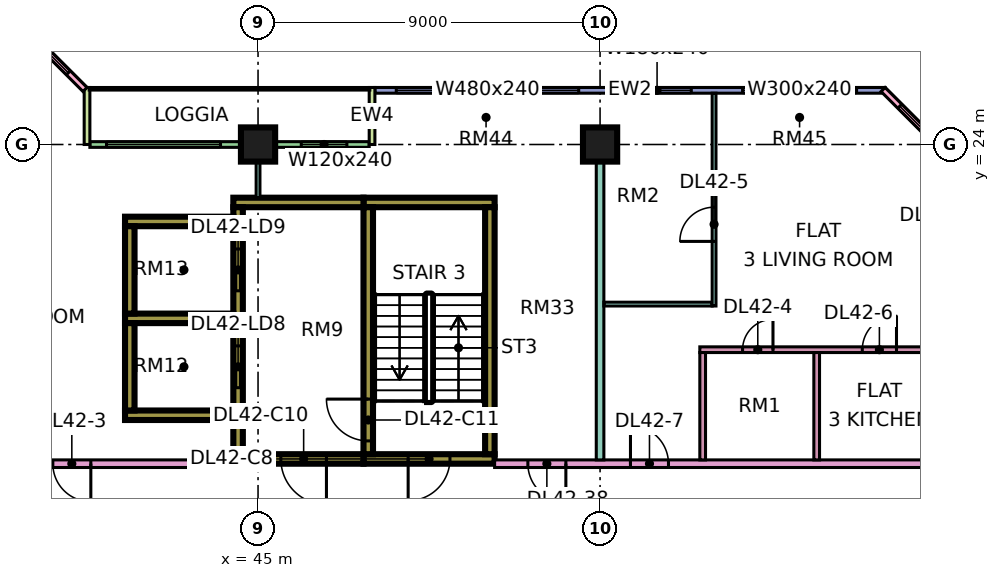
"""IFC4 building model, lengths in metres.
Left out: names, types, materials, properties, quantities, classifications, styles, units other than length and angle.
Written with IfcOpenShell. Run it as: python <this file> out.ifc"""

import sys

from ifc_helpers import new_model, si_unit, direction, frame, frame_2d, origin, origin_2d, place, context, subcontext, project, spatial, rectangle, extrude, element, fill, save


model = new_model("IFC4")
c1 = context("Model", 3, precision=1e-05, world=origin(), true_north=direction((0.0, 1.0)))
c2 = subcontext(c1, "Body", "Model", "MODEL_VIEW")
j1 = project(units=[si_unit("LENGTHUNIT", "METRE"), si_unit("PLANEANGLEUNIT", "RADIAN")], contexts=[c1])
p1 = place(None, origin())
s1 = spatial("IfcSite", under=j1, at=p1, CompositionType="ELEMENT")
p2 = place(p1, origin())
s2 = spatial("IfcBuilding", under=s1, at=p2, CompositionType="ELEMENT")
p3 = place(p2, frame((0.0, 0.0, 183.65)))
s3 = spatial("IfcBuildingStorey", under=s2, at=p3, CompositionType="ELEMENT", Elevation=183.65)
for number, where, z_axis, x_axis in (
    (1, (45.0, 24.0, 0.0), (0.0, 0.0, 1.0), (1.0, 0.0, 0.0)),
    (2, (54.0, 24.0, 0.0), (0.0, 0.0, 1.0), (1.0, 0.0, 0.0)),
):
    element("IfcColumn", number, at=place(p3, frame(where, z_axis=z_axis, x_axis=x_axis)), inside=s3, PredefinedType="COLUMN", context=c2, shape_type="SweptSolid", body=[
        extrude(rectangle(XDim=0.9, YDim=0.9, at=origin_2d()), origin(), (0.0, 0.0, 1.0), 3.75),
    ])
p4 = place(p3, frame((47.775, 15.725, 0.0), z_axis=(0.0, 0.0, 1.0), x_axis=(1.0, 0.0, 0.0)))
e3 = element("IfcWall", 3, at=p4, inside=s3, PredefinedType="SHEAR", context=c2, shape_type="SweptSolid", body=[
    extrude(rectangle(XDim=3.45, YDim=0.25, at=frame_2d((1.725, 0.0))), origin(), (0.0, 0.0, 1.0), 3.75),
])
p5 = place(p4, frame((1.175, 0.0, 0.0)))
e4 = element("IfcOpeningElement", 4, at=p5, cuts=e3, PredefinedType="OPENING", context=c2, shape_type="SweptSolid", body=[
    extrude(rectangle(XDim=1.1, YDim=2.2, at=frame_2d((0.55, 1.1))), frame((0.0, 0.135, 0.0), z_axis=(0.0, -1.0, 0.0), x_axis=(1.0, 0.0, 0.0)), (0.0, 0.0, 1.0), 0.27),
])
p6 = place(p3, frame((47.775, 22.475, 0.0), z_axis=(0.0, 0.0, 1.0), x_axis=(1.0, 0.0, 0.0)))
e5 = element("IfcWall", 5, at=p6, inside=s3, PredefinedType="SHEAR", context=c2, shape_type="SweptSolid", body=[
    extrude(rectangle(XDim=3.45, YDim=0.25, at=frame_2d((1.725, 0.0))), origin(), (0.0, 0.0, 1.0), 3.75),
])
p7 = place(p3, frame((47.9, 15.85, 0.0), z_axis=(0.0, 0.0, 1.0), x_axis=(0.0, 1.0, 0.0)))
e6 = element("IfcWall", 6, at=p7, inside=s3, PredefinedType="SHEAR", context=c2, shape_type="SweptSolid", body=[
    extrude(rectangle(XDim=6.5, YDim=0.25, at=frame_2d((3.25, 0.0))), origin(), (0.0, 0.0, 1.0), 3.75),
])
p8 = place(p7, frame((0.35, 0.0, 0.0)))
e7 = element("IfcOpeningElement", 7, at=p8, cuts=e6, PredefinedType="OPENING", context=c2, shape_type="SweptSolid", body=[
    extrude(rectangle(XDim=1.1, YDim=2.2, at=frame_2d((0.55, 1.1))), frame((0.0, 0.135, 0.0), z_axis=(0.0, -1.0, 0.0), x_axis=(1.0, 0.0, 0.0)), (0.0, 0.0, 1.0), 0.27),
])
p9 = place(p3, frame((51.1, 15.85, 0.0), z_axis=(0.0, 0.0, 1.0), x_axis=(0.0, 1.0, 0.0)))
e8 = element("IfcWall", 8, at=p9, inside=s3, PredefinedType="SHEAR", context=c2, shape_type="SweptSolid", body=[
    extrude(rectangle(XDim=6.5, YDim=0.25, at=frame_2d((3.25, 0.0))), origin(), (0.0, 0.0, 1.0), 3.75),
])
p10 = place(p3, frame((44.35, 15.725, 0.0), z_axis=(0.0, 0.0, 1.0), x_axis=(1.0, 0.0, 0.0)))
e9 = element("IfcWall", 9, at=p10, inside=s3, PredefinedType="SHEAR", context=c2, shape_type="SweptSolid", body=[
    extrude(rectangle(XDim=3.425, YDim=0.25, at=frame_2d((1.712, 0.0))), origin(), (0.0, 0.0, 1.0), 3.75),
])
p11 = place(p10, frame((1.25, 0.0, 0.0)))
e10 = element("IfcOpeningElement", 10, at=p11, cuts=e9, PredefinedType="OPENING", context=c2, shape_type="SweptSolid", body=[
    extrude(rectangle(XDim=1.2, YDim=2.2, at=frame_2d((0.6, 1.1))), frame((0.0, 0.135, 0.0), z_axis=(0.0, -1.0, 0.0), x_axis=(1.0, 0.0, 0.0)), (0.0, 0.0, 1.0), 0.27),
])
p12 = place(p3, frame((44.35, 22.475, 0.0), z_axis=(0.0, 0.0, 1.0), x_axis=(1.0, 0.0, 0.0)))
e11 = element("IfcWall", 11, at=p12, inside=s3, PredefinedType="SHEAR", context=c2, shape_type="SweptSolid", body=[
    extrude(rectangle(XDim=3.425, YDim=0.25, at=frame_2d((1.712, 0.0))), origin(), (0.0, 0.0, 1.0), 3.75),
])
p13 = place(p3, frame((44.475, 15.85, 0.0), z_axis=(0.0, 0.0, 1.0), x_axis=(0.0, 1.0, 0.0)))
e12 = element("IfcWall", 12, at=p13, inside=s3, PredefinedType="SHEAR", context=c2, shape_type="SweptSolid", body=[
    extrude(rectangle(XDim=6.5, YDim=0.25, at=frame_2d((3.25, 0.0))), origin(), (0.0, 0.0, 1.0), 3.75),
])
p14 = place(p13, frame((1.75, 0.0, 0.0)))
e13 = element("IfcOpeningElement", 13, at=p14, cuts=e12, PredefinedType="OPENING", context=c2, shape_type="SweptSolid", body=[
    extrude(rectangle(XDim=1.1, YDim=2.2, at=frame_2d((0.55, 1.1))), frame((0.0, 0.135, 0.0), z_axis=(0.0, -1.0, 0.0), x_axis=(1.0, 0.0, 0.0)), (0.0, 0.0, 1.0), 0.27),
])
p15 = place(p13, frame((4.3, 0.0, 0.0)))
e14 = element("IfcOpeningElement", 14, at=p15, cuts=e12, PredefinedType="OPENING", context=c2, shape_type="SweptSolid", body=[
    extrude(rectangle(XDim=1.1, YDim=2.2, at=frame_2d((0.55, 1.1))), frame((0.0, 0.135, 0.0), z_axis=(0.0, -1.0, 0.0), x_axis=(1.0, 0.0, 0.0)), (0.0, 0.0, 1.0), 0.27),
])
for number, where, z_axis, x_axis in (
    (15, (41.5, 16.875, 0.0), (0.0, 0.0, 1.0), (1.0, 0.0, 0.0)),
    (16, (41.5, 19.425, 0.0), (0.0, 0.0, 1.0), (1.0, 0.0, 0.0)),
    (17, (41.5, 21.975, 0.0), (0.0, 0.0, 1.0), (1.0, 0.0, 0.0)),
):
    element("IfcWall", number, at=place(p3, frame(where, z_axis=z_axis, x_axis=x_axis)), inside=s3, PredefinedType="SHEAR", context=c2, shape_type="SweptSolid", body=[
        extrude(rectangle(XDim=2.85, YDim=0.25, at=frame_2d((1.425, 0.0))), origin(), (0.0, 0.0, 1.0), 3.75),
    ])
for number, where, z_axis, x_axis in (
    (18, (41.625, 17.0, 0.0), (0.0, 0.0, 1.0), (0.0, 1.0, 0.0)),
    (19, (41.625, 19.55, 0.0), (0.0, 0.0, 1.0), (0.0, 1.0, 0.0)),
):
    element("IfcWall", number, at=place(p3, frame(where, z_axis=z_axis, x_axis=x_axis)), inside=s3, PredefinedType="SHEAR", context=c2, shape_type="SweptSolid", body=[
        extrude(rectangle(XDim=2.3, YDim=0.25, at=frame_2d((1.15, 0.0))), origin(), (0.0, 0.0, 1.0), 3.75),
    ])
p16 = place(p3, frame((61.5, 25.425, 0.0), z_axis=(0.0, 0.0, 1.0), x_axis=(-1.0, 0.0, 0.0)))
e20 = element("IfcWall", 20, at=p16, inside=s3, PredefinedType="SOLIDWALL", context=c2, shape_type="SweptSolid", body=[
    extrude(rectangle(XDim=13.425, YDim=0.15, at=frame_2d((6.712, 0.0))), origin(), (0.0, 0.0, 1.0), 3.35),
])
p17 = place(p16, frame((0.75, 0.0, 0.45)))
e21 = element("IfcOpeningElement", 21, at=p17, cuts=e20, PredefinedType="OPENING", context=c2, shape_type="SweptSolid", body=[
    extrude(rectangle(XDim=3.0, YDim=2.4, at=frame_2d((1.5, 1.2))), frame((0.0, 0.085, 0.0), z_axis=(0.0, -1.0, 0.0), x_axis=(1.0, 0.0, 0.0)), (0.0, 0.0, 1.0), 0.17),
])
p18 = place(p16, frame((5.1, 0.0, 0.45)))
e22 = element("IfcOpeningElement", 22, at=p18, cuts=e20, PredefinedType="OPENING", context=c2, shape_type="SweptSolid", body=[
    extrude(rectangle(XDim=1.8, YDim=2.4, at=frame_2d((0.9, 1.2))), frame((0.0, 0.085, 0.0), z_axis=(0.0, -1.0, 0.0), x_axis=(1.0, 0.0, 0.0)), (0.0, 0.0, 1.0), 0.17),
])
p19 = place(p16, frame((8.062, 0.0, 0.45)))
e23 = element("IfcOpeningElement", 23, at=p19, cuts=e20, PredefinedType="OPENING", context=c2, shape_type="SweptSolid", body=[
    extrude(rectangle(XDim=4.8, YDim=2.4, at=frame_2d((2.4, 1.2))), frame((0.0, 0.085, 0.0), z_axis=(0.0, -1.0, 0.0), x_axis=(1.0, 0.0, 0.0)), (0.0, 0.0, 1.0), 0.17),
])
p20 = place(p3, frame((47.925, 24.0, 0.0), z_axis=(0.0, 0.0, 1.0), x_axis=(-1.0, 0.0, 0.0)))
e24 = element("IfcWall", 24, at=p20, inside=s3, PredefinedType="SOLIDWALL", context=c2, shape_type="SweptSolid", body=[
    extrude(rectangle(XDim=7.35, YDim=0.15, at=frame_2d((3.675, 0.0))), origin(), (0.0, 0.0, 1.0), 3.35),
])
p21 = place(p20, frame((0.587, 0.0, 0.45)))
e25 = element("IfcOpeningElement", 25, at=p21, cuts=e24, PredefinedType="OPENING", context=c2, shape_type="SweptSolid", body=[
    extrude(rectangle(XDim=1.2, YDim=2.4, at=frame_2d((0.6, 1.2))), frame((0.0, 0.085, 0.0), z_axis=(0.0, -1.0, 0.0), x_axis=(1.0, 0.0, 0.0)), (0.0, 0.0, 1.0), 0.17),
])
p22 = place(p20, frame((3.913, 0.0, 0.45)))
e26 = element("IfcOpeningElement", 26, at=p22, cuts=e24, PredefinedType="OPENING", context=c2, shape_type="SweptSolid", body=[
    extrude(rectangle(XDim=3.0, YDim=2.4, at=frame_2d((1.5, 1.2))), frame((0.0, 0.085, 0.0), z_axis=(0.0, -1.0, 0.0), x_axis=(1.0, 0.0, 0.0)), (0.0, 0.0, 1.0), 0.17),
])
for number, where, z_axis, x_axis in (
    (27, (48.0, 25.5, 0.0), (0.0, 0.0, 1.0), (0.0, -1.0, 0.0)),
    (28, (40.5, 25.5, 0.0), (0.0, 0.0, 1.0), (0.0, -1.0, 0.0)),
):
    element("IfcWall", number, at=place(p3, frame(where, z_axis=z_axis, x_axis=x_axis)), inside=s3, PredefinedType="SOLIDWALL", context=c2, shape_type="SweptSolid", body=[
        extrude(rectangle(XDim=1.5, YDim=0.15, at=frame_2d((0.75, 0.0))), origin(), (0.0, 0.0, 1.0), 3.35),
    ])
p23 = place(p3, frame((40.447, 25.447, 0.0), z_axis=(0.0, 0.0, 1.0), x_axis=(-0.707106781187, 0.707106781187, 0.0)))
e29 = element("IfcWall", 29, at=p23, inside=s3, PredefinedType="SOLIDWALL", context=c2, shape_type="SweptSolid", body=[
    extrude(rectangle(XDim=4.243, YDim=0.15, at=frame_2d((2.121, 0.0))), origin(), (0.0, 0.0, 1.0), 3.35),
])
p24 = place(p23, frame((0.621, 0.0, 0.45)))
e30 = element("IfcOpeningElement", 30, at=p24, cuts=e29, PredefinedType="OPENING", context=c2, shape_type="SweptSolid", body=[
    extrude(rectangle(XDim=3.0, YDim=2.4, at=frame_2d((1.5, 1.2))), frame((0.0, 0.085, 0.0), z_axis=(0.0, -1.0, 0.0), x_axis=(1.0, 0.0, 0.0)), (0.0, 0.0, 1.0), 0.17),
])
p25 = place(p3, frame((64.447, 22.447, 0.0), z_axis=(0.0, 0.0, 1.0), x_axis=(-0.707106781187, 0.707106781187, 0.0)))
e31 = element("IfcWall", 31, at=p25, inside=s3, PredefinedType="SOLIDWALL", context=c2, shape_type="SweptSolid", body=[
    extrude(rectangle(XDim=4.243, YDim=0.15, at=frame_2d((2.121, 0.0))), origin(), (0.0, 0.0, 1.0), 3.35),
])
p26 = place(p25, frame((0.621, 0.0, 0.45)))
e32 = element("IfcOpeningElement", 32, at=p26, cuts=e31, PredefinedType="OPENING", context=c2, shape_type="SweptSolid", body=[
    extrude(rectangle(XDim=3.0, YDim=2.4, at=frame_2d((1.5, 1.2))), frame((0.0, 0.085, 0.0), z_axis=(0.0, -1.0, 0.0), x_axis=(1.0, 0.0, 0.0)), (0.0, 0.0, 1.0), 0.17),
])
p27 = place(p3, frame((34.0, 15.6, 0.0), z_axis=(0.0, 0.0, 1.0), x_axis=(1.0, 0.0, 0.0)))
e33 = element("IfcWall", 33, at=p27, inside=s3, PredefinedType="PARTITIONING", context=c2, shape_type="SweptSolid", body=[
    extrude(rectangle(XDim=10.35, YDim=0.2, at=frame_2d((5.175, 0.0))), origin(), (0.0, 0.0, 1.0), 3.35),
])
p28 = place(p27, frame((5.6, 0.0, 0.0)))
e34 = element("IfcOpeningElement", 34, at=p28, cuts=e33, PredefinedType="OPENING", context=c2, shape_type="SweptSolid", body=[
    extrude(rectangle(XDim=1.0, YDim=2.1, at=frame_2d((0.5, 1.05))), frame((0.0, 0.11, 0.0), z_axis=(0.0, -1.0, 0.0), x_axis=(1.0, 0.0, 0.0)), (0.0, 0.0, 1.0), 0.22),
])
p29 = place(p27, frame((0.45, 0.0, 0.0)))
e35 = element("IfcOpeningElement", 35, at=p29, cuts=e33, PredefinedType="OPENING", context=c2, shape_type="SweptSolid", body=[
    extrude(rectangle(XDim=1.2, YDim=2.1, at=frame_2d((0.6, 1.05))), frame((0.0, 0.11, 0.0), z_axis=(0.0, -1.0, 0.0), x_axis=(1.0, 0.0, 0.0)), (0.0, 0.0, 1.0), 0.22),
])
p30 = place(p3, frame((45.0, 22.6, 0.0), z_axis=(0.0, 0.0, 1.0), x_axis=(0.0, 1.0, 0.0)))
e36 = element("IfcWall", 36, at=p30, inside=s3, PredefinedType="PARTITIONING", context=c2, shape_type="SweptSolid", body=[
    extrude(rectangle(XDim=1.326, YDim=0.1, at=frame_2d((0.663, 0.0))), origin(), (0.0, 0.0, 1.0), 3.35),
])
p31 = place(p3, frame((51.225, 15.6, 0.0), z_axis=(0.0, 0.0, 1.0), x_axis=(1.0, 0.0, 0.0)))
e37 = element("IfcWall", 37, at=p31, inside=s3, PredefinedType="PARTITIONING", context=c2, shape_type="SweptSolid", body=[
    extrude(rectangle(XDim=11.701, YDim=0.2, at=frame_2d((5.851, 0.0))), origin(), (0.0, 0.0, 1.0), 3.35),
])
p32 = place(p31, frame((3.575, 0.0, 0.0)))
e38 = element("IfcOpeningElement", 38, at=p32, cuts=e37, PredefinedType="OPENING", context=c2, shape_type="SweptSolid", body=[
    extrude(rectangle(XDim=1.0, YDim=2.1, at=frame_2d((0.5, 1.05))), frame((0.0, 0.11, 0.0), z_axis=(0.0, -1.0, 0.0), x_axis=(1.0, 0.0, 0.0)), (0.0, 0.0, 1.0), 0.22),
])
p33 = place(p31, frame((0.875, 0.0, 0.0)))
e39 = element("IfcOpeningElement", 39, at=p33, cuts=e37, PredefinedType="OPENING", context=c2, shape_type="SweptSolid", body=[
    extrude(rectangle(XDim=1.0, YDim=2.1, at=frame_2d((0.5, 1.05))), frame((0.0, 0.11, 0.0), z_axis=(0.0, -1.0, 0.0), x_axis=(1.0, 0.0, 0.0)), (0.0, 0.0, 1.0), 0.22),
])
p34 = place(p3, frame((54.0, 15.7, 0.0), z_axis=(0.0, 0.0, 1.0), x_axis=(0.0, 1.0, 0.0)))
e40 = element("IfcWall", 40, at=p34, inside=s3, PredefinedType="PARTITIONING", context=c2, shape_type="SweptSolid", body=[
    extrude(rectangle(XDim=8.3, YDim=0.2, at=frame_2d((4.15, 0.0))), origin(), (0.0, 0.0, 1.0), 3.35),
])
p35 = place(p3, frame((54.1, 19.8, 0.0), z_axis=(0.0, 0.0, 1.0), x_axis=(1.0, 0.0, 0.0)))
e41 = element("IfcWall", 41, at=p35, inside=s3, PredefinedType="PARTITIONING", context=c2, shape_type="SweptSolid", body=[
    extrude(rectangle(XDim=2.85, YDim=0.1, at=frame_2d((1.425, 0.0))), origin(), (0.0, 0.0, 1.0), 3.35),
])
p36 = place(p3, frame((56.625, 18.6, 0.0), z_axis=(0.0, 0.0, 1.0), x_axis=(1.0, 0.0, 0.0)))
e42 = element("IfcWall", 42, at=p36, inside=s3, PredefinedType="PARTITIONING", context=c2, shape_type="SweptSolid", body=[
    extrude(rectangle(XDim=6.301, YDim=0.15, at=frame_2d((3.15, 0.0))), origin(), (0.0, 0.0, 1.0), 3.35),
])
p37 = place(p36, frame((1.125, 0.0, 0.0)))
e43 = element("IfcOpeningElement", 43, at=p37, cuts=e42, PredefinedType="OPENING", context=c2, shape_type="SweptSolid", body=[
    extrude(rectangle(XDim=0.8, YDim=2.1, at=frame_2d((0.4, 1.05))), frame((0.0, 0.085, 0.0), z_axis=(0.0, -1.0, 0.0), x_axis=(1.0, 0.0, 0.0)), (0.0, 0.0, 1.0), 0.17),
])
p38 = place(p36, frame((4.275, 0.0, 0.0)))
e44 = element("IfcOpeningElement", 44, at=p38, cuts=e42, PredefinedType="OPENING", context=c2, shape_type="SweptSolid", body=[
    extrude(rectangle(XDim=0.9, YDim=2.1, at=frame_2d((0.45, 1.05))), frame((0.0, 0.085, 0.0), z_axis=(0.0, -1.0, 0.0), x_axis=(1.0, 0.0, 0.0)), (0.0, 0.0, 1.0), 0.17),
])
p39 = place(p3, frame((56.7, 15.7, 0.0), z_axis=(0.0, 0.0, 1.0), x_axis=(0.0, 1.0, 0.0)))
e45 = element("IfcWall", 45, at=p39, inside=s3, PredefinedType="PARTITIONING", context=c2, shape_type="SweptSolid", body=[
    extrude(rectangle(XDim=2.825, YDim=0.15, at=frame_2d((1.413, 0.0))), origin(), (0.0, 0.0, 1.0), 3.35),
])
p40 = place(p3, frame((57.0, 19.75, 0.0), z_axis=(0.0, 0.0, 1.0), x_axis=(0.0, 1.0, 0.0)))
e46 = element("IfcWall", 46, at=p40, inside=s3, PredefinedType="PARTITIONING", context=c2, shape_type="SweptSolid", body=[
    extrude(rectangle(XDim=5.6, YDim=0.1, at=frame_2d((2.8, 0.0))), origin(), (0.0, 0.0, 1.0), 3.35),
])
p41 = place(p40, frame((1.7, 0.0, 0.0)))
e47 = element("IfcOpeningElement", 47, at=p41, cuts=e46, PredefinedType="OPENING", context=c2, shape_type="SweptSolid", body=[
    extrude(rectangle(XDim=0.9, YDim=2.1, at=frame_2d((0.45, 1.05))), frame((0.0, 0.06, 0.0), z_axis=(0.0, -1.0, 0.0), x_axis=(1.0, 0.0, 0.0)), (0.0, 0.0, 1.0), 0.12),
])
p42 = place(p3, frame((59.7, 15.7, 0.0), z_axis=(0.0, 0.0, 1.0), x_axis=(0.0, 1.0, 0.0)))
e48 = element("IfcWall", 48, at=p42, inside=s3, PredefinedType="PARTITIONING", context=c2, shape_type="SweptSolid", body=[
    extrude(rectangle(XDim=2.825, YDim=0.15, at=frame_2d((1.413, 0.0))), origin(), (0.0, 0.0, 1.0), 3.35),
])
p43 = place(p17, origin())
e49 = element("IfcWindow", 49, at=p43, inside=s3, PartitioningType="SINGLE_PANEL", PredefinedType="WINDOW", context=c2, shape_type="SweptSolid", body=[
    extrude(rectangle(XDim=3.0, YDim=2.4, at=frame_2d((1.5, 1.2))), frame((0.0, 0.03, 0.0), z_axis=(0.0, -1.0, 0.0), x_axis=(1.0, 0.0, 0.0)), (0.0, 0.0, 1.0), 0.06),
])
fill(e21, e49)
p44 = place(p18, origin())
e50 = element("IfcWindow", 50, at=p44, inside=s3, PartitioningType="SINGLE_PANEL", PredefinedType="WINDOW", context=c2, shape_type="SweptSolid", body=[
    extrude(rectangle(XDim=1.8, YDim=2.4, at=frame_2d((0.9, 1.2))), frame((0.0, 0.03, 0.0), z_axis=(0.0, -1.0, 0.0), x_axis=(1.0, 0.0, 0.0)), (0.0, 0.0, 1.0), 0.06),
])
fill(e22, e50)
p45 = place(p19, origin())
e51 = element("IfcWindow", 51, at=p45, inside=s3, PartitioningType="SINGLE_PANEL", PredefinedType="WINDOW", context=c2, shape_type="SweptSolid", body=[
    extrude(rectangle(XDim=4.8, YDim=2.4, at=frame_2d((2.4, 1.2))), frame((0.0, 0.03, 0.0), z_axis=(0.0, -1.0, 0.0), x_axis=(1.0, 0.0, 0.0)), (0.0, 0.0, 1.0), 0.06),
])
fill(e23, e51)
p46 = place(p21, origin())
e52 = element("IfcWindow", 52, at=p46, inside=s3, PartitioningType="SINGLE_PANEL", PredefinedType="WINDOW", context=c2, shape_type="SweptSolid", body=[
    extrude(rectangle(XDim=1.2, YDim=2.4, at=frame_2d((0.6, 1.2))), frame((0.0, 0.03, 0.0), z_axis=(0.0, -1.0, 0.0), x_axis=(1.0, 0.0, 0.0)), (0.0, 0.0, 1.0), 0.06),
])
fill(e25, e52)
p47 = place(p22, origin())
e53 = element("IfcWindow", 53, at=p47, inside=s3, PartitioningType="SINGLE_PANEL", PredefinedType="WINDOW", context=c2, shape_type="SweptSolid", body=[
    extrude(rectangle(XDim=3.0, YDim=2.4, at=frame_2d((1.5, 1.2))), frame((0.0, 0.03, 0.0), z_axis=(0.0, -1.0, 0.0), x_axis=(1.0, 0.0, 0.0)), (0.0, 0.0, 1.0), 0.06),
])
fill(e26, e53)
p48 = place(p24, origin())
e54 = element("IfcWindow", 54, at=p48, inside=s3, PartitioningType="SINGLE_PANEL", PredefinedType="WINDOW", context=c2, shape_type="SweptSolid", body=[
    extrude(rectangle(XDim=3.0, YDim=2.4, at=frame_2d((1.5, 1.2))), frame((0.0, 0.03, 0.0), z_axis=(0.0, -1.0, 0.0), x_axis=(1.0, 0.0, 0.0)), (0.0, 0.0, 1.0), 0.06),
])
fill(e30, e54)
p49 = place(p26, origin())
e55 = element("IfcWindow", 55, at=p49, inside=s3, PartitioningType="SINGLE_PANEL", PredefinedType="WINDOW", context=c2, shape_type="SweptSolid", body=[
    extrude(rectangle(XDim=3.0, YDim=2.4, at=frame_2d((1.5, 1.2))), frame((0.0, 0.03, 0.0), z_axis=(0.0, -1.0, 0.0), x_axis=(1.0, 0.0, 0.0)), (0.0, 0.0, 1.0), 0.06),
])
fill(e32, e55)
p50 = place(p5, frame((1.1, 0.0, 0.0), z_axis=(0.0, 0.0, 1.0), x_axis=(-1.0, 0.0, 0.0)))
e56 = element("IfcDoor", 56, at=p50, inside=s3, OperationType="SINGLE_SWING_LEFT", PredefinedType="DOOR", context=c2, shape_type="SweptSolid", body=[
    extrude(rectangle(XDim=1.1, YDim=2.2, at=frame_2d((0.55, 1.1))), frame((0.0, 0.025, 0.0), z_axis=(0.0, -1.0, 0.0), x_axis=(1.0, 0.0, 0.0)), (0.0, 0.0, 1.0), 0.05),
])
fill(e4, e56)
p51 = place(p11, origin())
e57 = element("IfcDoor", 57, at=p51, inside=s3, OperationType="SINGLE_SWING_RIGHT", PredefinedType="DOOR", context=c2, shape_type="SweptSolid", body=[
    extrude(rectangle(XDim=1.2, YDim=2.2, at=frame_2d((0.6, 1.1))), frame((0.0, 0.025, 0.0), z_axis=(0.0, -1.0, 0.0), x_axis=(1.0, 0.0, 0.0)), (0.0, 0.0, 1.0), 0.05),
])
fill(e10, e57)
p52 = place(p8, frame((1.1, 0.0, 0.0), z_axis=(0.0, 0.0, 1.0), x_axis=(-1.0, 0.0, 0.0)))
e58 = element("IfcDoor", 58, at=p52, inside=s3, OperationType="SINGLE_SWING_RIGHT", PredefinedType="DOOR", context=c2, shape_type="SweptSolid", body=[
    extrude(rectangle(XDim=1.1, YDim=2.2, at=frame_2d((0.55, 1.1))), frame((0.0, 0.025, 0.0), z_axis=(0.0, -1.0, 0.0), x_axis=(1.0, 0.0, 0.0)), (0.0, 0.0, 1.0), 0.05),
])
fill(e7, e58)
p53 = place(p14, origin())
e59 = element("IfcDoor", 59, at=p53, inside=s3, OperationType="DOUBLE_DOOR_SLIDING", PredefinedType="DOOR", context=c2, shape_type="SweptSolid", body=[
    extrude(rectangle(XDim=1.1, YDim=2.2, at=frame_2d((0.55, 1.1))), frame((0.0, 0.025, 0.0), z_axis=(0.0, -1.0, 0.0), x_axis=(1.0, 0.0, 0.0)), (0.0, 0.0, 1.0), 0.05),
])
fill(e13, e59)
p54 = place(p15, origin())
e60 = element("IfcDoor", 60, at=p54, inside=s3, OperationType="DOUBLE_DOOR_SLIDING", PredefinedType="DOOR", context=c2, shape_type="SweptSolid", body=[
    extrude(rectangle(XDim=1.1, YDim=2.2, at=frame_2d((0.55, 1.1))), frame((0.0, 0.025, 0.0), z_axis=(0.0, -1.0, 0.0), x_axis=(1.0, 0.0, 0.0)), (0.0, 0.0, 1.0), 0.05),
])
fill(e14, e60)
p55 = place(p28, origin())
e61 = element("IfcDoor", 61, at=p55, inside=s3, OperationType="SINGLE_SWING_RIGHT", PredefinedType="DOOR", context=c2, shape_type="SweptSolid", body=[
    extrude(rectangle(XDim=1.0, YDim=2.1, at=frame_2d((0.5, 1.05))), frame((0.0, 0.025, 0.0), z_axis=(0.0, -1.0, 0.0), x_axis=(1.0, 0.0, 0.0)), (0.0, 0.0, 1.0), 0.05),
])
fill(e34, e61)
p56 = place(p37, frame((0.8, 0.0, 0.0), z_axis=(0.0, 0.0, 1.0), x_axis=(-1.0, 0.0, 0.0)))
e62 = element("IfcDoor", 62, at=p56, inside=s3, OperationType="SINGLE_SWING_RIGHT", PredefinedType="DOOR", context=c2, shape_type="SweptSolid", body=[
    extrude(rectangle(XDim=0.8, YDim=2.1, at=frame_2d((0.4, 1.05))), frame((0.0, 0.025, 0.0), z_axis=(0.0, -1.0, 0.0), x_axis=(1.0, 0.0, 0.0)), (0.0, 0.0, 1.0), 0.05),
])
fill(e43, e62)
p57 = place(p41, origin())
e63 = element("IfcDoor", 63, at=p57, inside=s3, OperationType="SINGLE_SWING_LEFT", PredefinedType="DOOR", context=c2, shape_type="SweptSolid", body=[
    extrude(rectangle(XDim=0.9, YDim=2.1, at=frame_2d((0.45, 1.05))), frame((0.0, 0.025, 0.0), z_axis=(0.0, -1.0, 0.0), x_axis=(1.0, 0.0, 0.0)), (0.0, 0.0, 1.0), 0.05),
])
fill(e47, e63)
p58 = place(p38, frame((0.9, 0.0, 0.0), z_axis=(0.0, 0.0, 1.0), x_axis=(-1.0, 0.0, 0.0)))
e64 = element("IfcDoor", 64, at=p58, inside=s3, OperationType="SINGLE_SWING_RIGHT", PredefinedType="DOOR", context=c2, shape_type="SweptSolid", body=[
    extrude(rectangle(XDim=0.9, YDim=2.1, at=frame_2d((0.45, 1.05))), frame((0.0, 0.025, 0.0), z_axis=(0.0, -1.0, 0.0), x_axis=(1.0, 0.0, 0.0)), (0.0, 0.0, 1.0), 0.05),
])
fill(e44, e64)
p59 = place(p32, origin())
e65 = element("IfcDoor", 65, at=p59, inside=s3, OperationType="SINGLE_SWING_LEFT", PredefinedType="DOOR", context=c2, shape_type="SweptSolid", body=[
    extrude(rectangle(XDim=1.0, YDim=2.1, at=frame_2d((0.5, 1.05))), frame((0.0, 0.025, 0.0), z_axis=(0.0, -1.0, 0.0), x_axis=(1.0, 0.0, 0.0)), (0.0, 0.0, 1.0), 0.05),
])
fill(e38, e65)
p60 = place(p33, origin())
e66 = element("IfcDoor", 66, at=p60, inside=s3, OperationType="SINGLE_SWING_RIGHT", PredefinedType="DOOR", context=c2, shape_type="SweptSolid", body=[
    extrude(rectangle(XDim=1.0, YDim=2.1, at=frame_2d((0.5, 1.05))), frame((0.0, 0.025, 0.0), z_axis=(0.0, -1.0, 0.0), x_axis=(1.0, 0.0, 0.0)), (0.0, 0.0, 1.0), 0.05),
])
fill(e39, e66)
save(model, sys.argv[1])
